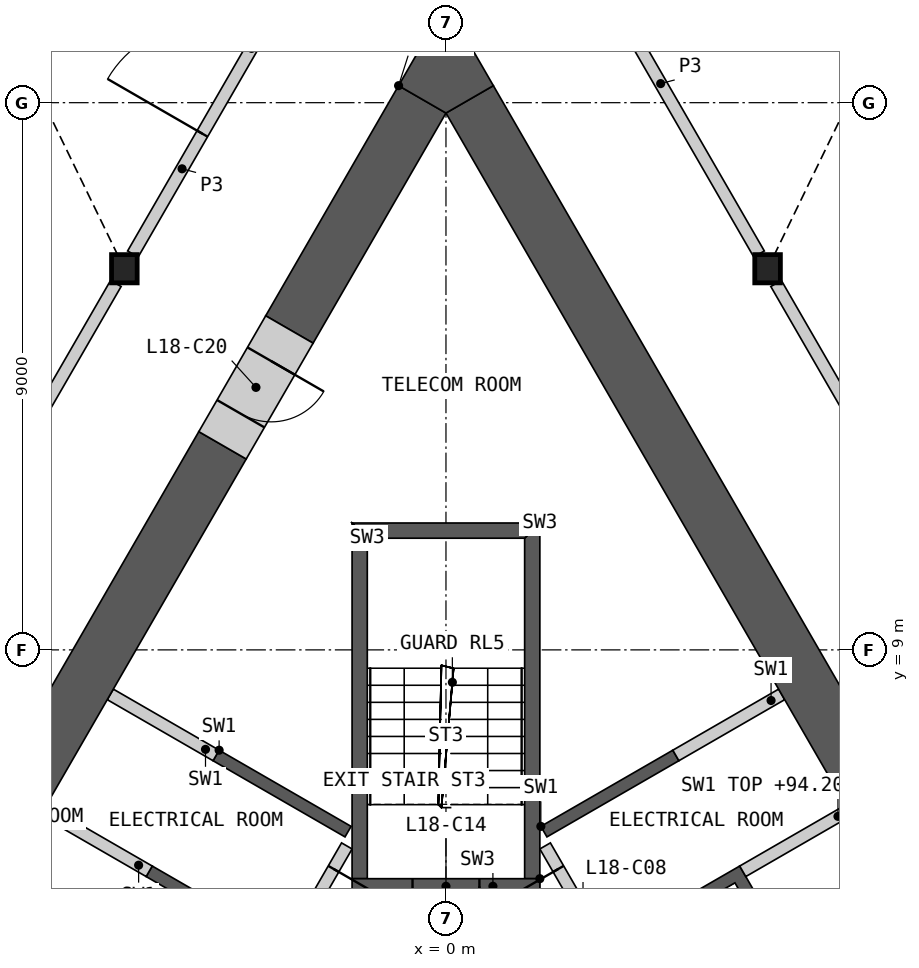
"""IFC4 building model, lengths in metres.
Left out: names, types, materials, properties, quantities, classifications, styles, units other than length and angle.
Written with IfcOpenShell. Run it as: python <this file> out.ifc"""

import sys

from ifc_helpers import new_model, si_unit, direction, frame, frame_2d, origin, origin_2d, place, context, subcontext, project, spatial, polyline, rectangle, i_section, outline, extrude, element, fill, save


model = new_model("IFC4")
c1 = context("Model", 3, precision=1e-05, world=origin(), true_north=direction((0.0, 1.0)))
c2 = subcontext(c1, "Body", "Model", "MODEL_VIEW")
j1 = project(units=[si_unit("LENGTHUNIT", "METRE"), si_unit("PLANEANGLEUNIT", "RADIAN")], contexts=[c1])
p1 = place(None, origin())
s1 = spatial("IfcSite", under=j1, at=p1, CompositionType="ELEMENT")
p2 = place(p1, origin())
s2 = spatial("IfcBuilding", under=s1, at=p2, CompositionType="ELEMENT")
p3 = place(p2, frame((0.0, 0.0, 84.6)))
s3 = spatial("IfcBuildingStorey", under=s2, at=p3, CompositionType="ELEMENT", Elevation=84.6)
for number, where, z_axis, x_axis in (
    (1, (-5.289, 15.269, 0.0), (0.0, 0.0, 1.0), (1.0, 0.0, 0.0)),
    (2, (5.289, 15.269, 0.0), (0.0, 0.0, 1.0), (1.0, 0.0, 0.0)),
):
    element("IfcColumn", number, at=place(p3, frame(where, z_axis=z_axis, x_axis=x_axis)), inside=s3, PredefinedType="COLUMN", context=c2, shape_type="SweptSolid", body=[
        extrude(i_section(OverallWidth=0.421, OverallDepth=0.465, WebThickness=0.045, FlangeThickness=0.072, at=origin_2d()), origin(), (0.0, 0.0, 1.0), 10.0),
    ])
p4 = place(p3, origin())
e3 = element("IfcWall", 3, at=p4, inside=s3, PredefinedType="SHEAR", context=c2, shape_type="SweptSolid", body=[
    extrude(outline(polyline([(1.561, 6.097), (3.731, 7.35), (3.831, 7.177), (1.66, 5.924), (1.561, 6.097)])), origin(), (0.0, 0.0, 1.0), 9.6),
])
p5 = place(p3, origin())
e4 = element("IfcWall", 4, at=p5, inside=s3, PredefinedType="SHEAR", context=c2, shape_type="SweptSolid", body=[
    extrude(outline(polyline([(2.66, 4.192), (4.831, 5.445), (8.231, -0.444), (6.061, -1.697), (5.96, -1.524), (7.952, -0.374), (6.952, 1.358), (4.96, 0.208), (4.861, 0.381), (6.852, 1.531), (5.852, 3.263), (3.861, 2.113), (3.76, 2.287), (5.752, 3.437), (4.752, 5.169), (2.76, 4.019), (2.66, 4.192)])), origin(), (0.0, 0.0, 1.0), 9.6),
])
p6 = place(p3, frame((5.817, -1.476, 0.0), z_axis=(0.0, 0.0, 1.0), x_axis=(-0.500002616675, 0.866023893041, 0.0)))
e5 = element("IfcWall", 5, at=p6, inside=s3, PredefinedType="SOLIDWALL", context=c2, shape_type="SweptSolid", body=[
    extrude(rectangle(XDim=8.373, YDim=0.2, at=frame_2d((4.187, 0.0))), origin(), (0.0, 0.0, 1.0), 9.6),
])
p7 = place(p6, frame((0.337, 0.0, 0.0)))
e6 = element("IfcOpeningElement", 6, at=p7, cuts=e5, PredefinedType="OPENING", context=c2, shape_type="SweptSolid", body=[
    extrude(rectangle(XDim=1.1, YDim=2.1, at=frame_2d((0.55, 1.05))), frame((0.0, 0.11, 0.0), z_axis=(0.0, -1.0, 0.0), x_axis=(1.0, 0.0, 0.0)), (0.0, 0.0, 1.0), 0.22),
])
p8 = place(p6, frame((2.537, 0.0, 0.0)))
e7 = element("IfcOpeningElement", 7, at=p8, cuts=e5, PredefinedType="OPENING", context=c2, shape_type="SweptSolid", body=[
    extrude(rectangle(XDim=1.1, YDim=2.1, at=frame_2d((0.55, 1.05))), frame((0.0, 0.11, 0.0), z_axis=(0.0, -1.0, 0.0), x_axis=(1.0, 0.0, 0.0)), (0.0, 0.0, 1.0), 0.22),
])
p9 = place(p6, frame((4.737, 0.0, 0.0)))
e8 = element("IfcOpeningElement", 8, at=p9, cuts=e5, PredefinedType="OPENING", context=c2, shape_type="SweptSolid", body=[
    extrude(rectangle(XDim=1.1, YDim=2.1, at=frame_2d((0.55, 1.05))), frame((0.0, 0.11, 0.0), z_axis=(0.0, -1.0, 0.0), x_axis=(1.0, 0.0, 0.0)), (0.0, 0.0, 1.0), 0.22),
])
p10 = place(p6, frame((7.037, 0.0, 0.0)))
e9 = element("IfcOpeningElement", 9, at=p10, cuts=e5, PredefinedType="OPENING", context=c2, shape_type="SweptSolid", body=[
    extrude(rectangle(XDim=0.9, YDim=2.1, at=frame_2d((0.45, 1.05))), frame((0.0, 0.11, 0.0), z_axis=(0.0, -1.0, 0.0), x_axis=(1.0, 0.0, 0.0)), (0.0, 0.0, 1.0), 0.22),
])
p11 = place(p3, frame((4.881, 5.358, 0.0), z_axis=(0.0, 0.0, 1.0), x_axis=(0.866035824272, 0.499981950752, 0.0)))
e10 = element("IfcWall", 10, at=p11, inside=s3, PredefinedType="SHEAR", context=c2, shape_type="SweptSolid", body=[
    extrude(rectangle(XDim=2.009, YDim=0.2, at=frame_2d((1.004, 0.0))), origin(), (0.0, 0.0, 1.0), 9.6),
])
p12 = place(p3, frame((3.781, 7.263, 0.0), z_axis=(0.0, 0.0, 1.0), x_axis=(0.865983199114, 0.50007309351, 0.0)))
e11 = element("IfcWall", 11, at=p12, inside=s3, PredefinedType="SHEAR", context=c2, shape_type="SweptSolid", body=[
    extrude(rectangle(XDim=2.009, YDim=0.2, at=frame_2d((1.004, 0.0))), origin(), (0.0, 0.0, 1.0), 9.6),
])
p13 = place(p3, origin())
e12 = element("IfcWall", 12, at=p13, inside=s3, PredefinedType="SHEAR", context=c2, shape_type="SweptSolid", body=[
    extrude(outline(polyline([(-2.76, 4.019), (-4.931, 5.272), (-4.831, 5.445), (-2.66, 4.192), (-2.76, 4.019)])), origin(), (0.0, 0.0, 1.0), 9.6),
])
p14 = place(p3, origin())
e13 = element("IfcWall", 13, at=p14, inside=s3, PredefinedType="SHEAR", context=c2, shape_type="SweptSolid", body=[
    extrude(outline(polyline([(-3.731, 7.35), (-1.561, 6.097), (-1.66, 5.924), (-3.831, 7.177), (-3.731, 7.35)])), origin(), (0.0, 0.0, 1.0), 9.6),
])
p15 = place(p3, frame((-1.631, 5.776, 0.0), z_axis=(0.0, 0.0, 1.0), x_axis=(-0.499992876559, -0.866029516466, 0.0)))
e14 = element("IfcWall", 14, at=p15, inside=s3, PredefinedType="SOLIDWALL", context=c2, shape_type="SweptSolid", body=[
    extrude(rectangle(XDim=6.486, YDim=0.2, at=frame_2d((3.243, 0.0))), origin(), (0.0, 0.0, 1.0), 9.6),
])
p16 = place(p15, frame((0.437, 0.0, 0.0)))
e15 = element("IfcOpeningElement", 15, at=p16, cuts=e14, PredefinedType="OPENING", context=c2, shape_type="SweptSolid", body=[
    extrude(rectangle(XDim=0.9, YDim=2.1, at=frame_2d((0.45, 1.05))), frame((0.0, 0.11, 0.0), z_axis=(0.0, -1.0, 0.0), x_axis=(1.0, 0.0, 0.0)), (0.0, 0.0, 1.0), 0.22),
])
p17 = place(p15, frame((2.637, 0.0, 0.0)))
e16 = element("IfcOpeningElement", 16, at=p17, cuts=e14, PredefinedType="OPENING", context=c2, shape_type="SweptSolid", body=[
    extrude(rectangle(XDim=0.9, YDim=2.1, at=frame_2d((0.45, 1.05))), frame((0.0, 0.11, 0.0), z_axis=(0.0, -1.0, 0.0), x_axis=(1.0, 0.0, 0.0)), (0.0, 0.0, 1.0), 0.22),
])
p18 = place(p3, frame((-3.781, 7.263, 0.0), z_axis=(0.0, 0.0, 1.0), x_axis=(-0.865983199114, 0.50007309351, 0.0)))
e17 = element("IfcWall", 17, at=p18, inside=s3, PredefinedType="SHEAR", context=c2, shape_type="SweptSolid", body=[
    extrude(rectangle(XDim=2.009, YDim=0.2, at=frame_2d((1.004, 0.0))), origin(), (0.0, 0.0, 1.0), 9.6),
])
p19 = place(p3, frame((-4.881, 5.358, 0.0), z_axis=(0.0, 0.0, 1.0), x_axis=(-0.866035824272, 0.499981950752, 0.0)))
e18 = element("IfcWall", 18, at=p19, inside=s3, PredefinedType="SHEAR", context=c2, shape_type="SweptSolid", body=[
    extrude(rectangle(XDim=2.009, YDim=0.2, at=frame_2d((1.004, 0.0))), origin(), (0.0, 0.0, 1.0), 9.6),
])
p20 = place(p3, origin())
e19 = element("IfcWall", 19, at=p20, inside=s3, PredefinedType="SHEAR", context=c2, shape_type="SweptSolid", body=[
    extrude(outline(polyline([(1.544, 5.237), (1.544, 11.087), (1.294, 10.837), (1.294, 5.237), (1.544, 5.237)])), origin(), (0.0, 0.0, 1.0), 9.6),
])
p21 = place(p3, origin())
e20 = element("IfcWall", 20, at=p21, inside=s3, PredefinedType="SHEAR", context=c2, shape_type="SweptSolid", body=[
    extrude(outline(polyline([(1.544, 11.087), (-1.544, 11.087), (-1.294, 10.837), (1.294, 10.837), (1.544, 11.087)])), origin(), (0.0, 0.0, 1.0), 9.6),
])
p22 = place(p3, origin())
e21 = element("IfcWall", 21, at=p22, inside=s3, PredefinedType="SHEAR", context=c2, shape_type="SweptSolid", body=[
    extrude(outline(polyline([(-1.294, 10.837), (-1.544, 11.087), (-1.544, 5.237), (-1.294, 5.237), (-1.294, 10.837)])), origin(), (0.0, 0.0, 1.0), 9.6),
])
p23 = place(p3, frame((1.544, 5.112, 0.0), z_axis=(0.0, 0.0, 1.0), x_axis=(-1.0, 0.0, 0.0)))
e22 = element("IfcWall", 22, at=p23, inside=s3, PredefinedType="SHEAR", context=c2, shape_type="SweptSolid", body=[
    extrude(rectangle(XDim=3.088, YDim=0.25, at=frame_2d((1.544, 0.0))), origin(), (0.0, 0.0, 1.0), 9.6),
])
p24 = place(p23, frame((0.994, 0.0, 0.0)))
e23 = element("IfcOpeningElement", 23, at=p24, cuts=e22, PredefinedType="OPENING", context=c2, shape_type="SweptSolid", body=[
    extrude(rectangle(XDim=1.1, YDim=2.1, at=frame_2d((0.55, 1.05))), frame((0.0, 0.135, 0.0), z_axis=(0.0, -1.0, 0.0), x_axis=(1.0, 0.0, 0.0)), (0.0, 0.0, 1.0), 0.27),
])
p25 = place(p3, frame((8.16, 4.596, 0.0), z_axis=(0.0, 0.0, 1.0), x_axis=(-0.500009830349, 0.866019728156, 0.0)))
e24 = element("IfcWall", 24, at=p25, inside=s3, PredefinedType="SHEAR", context=c2, shape_type="SweptSolid", body=[
    extrude(rectangle(XDim=15.541, YDim=0.9, at=frame_2d((7.771, 0.0))), origin(), (0.0, 0.0, 1.0), 9.6),
])
p26 = place(p3, frame((-3.675, 12.365, 0.0), z_axis=(0.0, 0.0, 1.0), x_axis=(-0.500014716158, -0.86601690724, 0.0)))
e25 = element("IfcWall", 25, at=p26, inside=s3, PredefinedType="SHEAR", context=c2, shape_type="SweptSolid", body=[
    extrude(rectangle(XDim=8.99, YDim=0.9, at=frame_2d((4.495, 0.0))), origin(), (0.0, 0.0, 1.0), 9.6),
])
p27 = place(p3, frame((-0.39, 18.055, 0.0), z_axis=(0.0, 0.0, 1.0), x_axis=(-0.500014193307, -0.86601720912, 0.0)))
e26 = element("IfcWall", 26, at=p27, inside=s3, PredefinedType="SHEAR", context=c2, shape_type="SweptSolid", body=[
    extrude(rectangle(XDim=4.37, YDim=0.9, at=frame_2d((2.185, 0.0))), origin(), (0.0, 0.0, 1.0), 9.6),
])
p28 = place(p3, origin())
e27 = element("IfcWall", 27, at=p28, inside=s3, PredefinedType="SHEAR", context=c2, shape_type="SweptSolid", body=[
    extrude(outline(polyline([(-0.779, 18.28), (0.0, 19.63), (0.779, 18.28), (0.0, 17.83), (-0.779, 18.28)])), origin(), (0.0, 0.0, 1.0), 9.6),
])
p29 = place(p3, frame((-2.575, 14.27, 0.0), z_axis=(0.0, 0.0, 1.0), x_axis=(-0.499981787252, -0.866035918664, 0.0)))
e28 = element("IfcWall", 28, at=p29, inside=s3, PredefinedType="SHEAR", context=c2, shape_type="SweptSolid", body=[
    extrude(rectangle(XDim=2.2, YDim=0.9, at=frame_2d((1.1, 0.0))), origin(), (0.0, 0.0, 1.0), 9.6),
])
p30 = place(p29, frame((0.6, 0.0, 0.0)))
e29 = element("IfcOpeningElement", 29, at=p30, cuts=e28, PredefinedType="OPENING", context=c2, shape_type="SweptSolid", body=[
    extrude(rectangle(XDim=1.0, YDim=2.1, at=frame_2d((0.5, 1.05))), frame((0.0, 0.46, 0.0), z_axis=(0.0, -1.0, 0.0), x_axis=(1.0, 0.0, 0.0)), (0.0, 0.0, 1.0), 0.92),
])
p31 = place(p3, frame((5.429, 15.026, 0.0), z_axis=(0.0, 0.0, 1.0), x_axis=(0.50001002959, -0.86601961312, 0.0)))
e30 = element("IfcWall", 30, at=p31, inside=s3, PredefinedType="PARTITIONING", context=c2, shape_type="SweptSolid", body=[
    extrude(rectangle(XDim=10.019, YDim=0.2, at=frame_2d((5.009, 0.0))), origin(), (0.0, 0.0, 1.0), 9.6),
])
p32 = place(p31, frame((4.059, 0.0, 0.0)))
e31 = element("IfcOpeningElement", 31, at=p32, cuts=e30, PredefinedType="OPENING", context=c2, shape_type="SweptSolid", body=[
    extrude(rectangle(XDim=1.8, YDim=2.1, at=frame_2d((0.9, 1.05))), frame((0.0, 0.11, 0.0), z_axis=(0.0, -1.0, 0.0), x_axis=(1.0, 0.0, 0.0)), (0.0, 0.0, 1.0), 0.22),
])
p33 = place(p3, frame((-10.439, 6.35, 0.0), z_axis=(0.0, 0.0, 1.0), x_axis=(0.50001002959, 0.86601961312, 0.0)))
e32 = element("IfcWall", 32, at=p33, inside=s3, PredefinedType="PARTITIONING", context=c2, shape_type="SweptSolid", body=[
    extrude(rectangle(XDim=10.019, YDim=0.2, at=frame_2d((5.009, 0.0))), origin(), (0.0, 0.0, 1.0), 9.6),
])
p34 = place(p3, frame((1.913, 21.116, 0.0), z_axis=(0.0, 0.0, 1.0), x_axis=(0.500001069878, -0.866024786089, 0.0)))
e33 = element("IfcWall", 33, at=p34, inside=s3, PredefinedType="PARTITIONING", context=c2, shape_type="SweptSolid", body=[
    extrude(rectangle(XDim=6.473, YDim=0.2, at=frame_2d((3.236, 0.0))), origin(), (0.0, 0.0, 1.0), 9.6),
])
p35 = place(p3, frame((-5.149, 15.511, 0.0), z_axis=(0.0, 0.0, 1.0), x_axis=(0.500001069878, 0.866024786089, 0.0)))
e34 = element("IfcWall", 34, at=p35, inside=s3, PredefinedType="PARTITIONING", context=c2, shape_type="SweptSolid", body=[
    extrude(rectangle(XDim=6.473, YDim=0.2, at=frame_2d((3.236, 0.0))), origin(), (0.0, 0.0, 1.0), 9.6),
])
p36 = place(p35, frame((2.285, 0.0, 0.0)))
e35 = element("IfcOpeningElement", 35, at=p36, cuts=e34, PredefinedType="OPENING", context=c2, shape_type="SweptSolid", body=[
    extrude(rectangle(XDim=1.8, YDim=2.1, at=frame_2d((0.9, 1.05))), frame((0.0, 0.11, 0.0), z_axis=(0.0, -1.0, 0.0), x_axis=(1.0, 0.0, 0.0)), (0.0, 0.0, 1.0), 0.22),
])
p37 = place(p10, origin())
e36 = element("IfcDoor", 36, at=p37, inside=s3, OperationType="SINGLE_SWING_RIGHT", PredefinedType="DOOR", context=c2, shape_type="SweptSolid", body=[
    extrude(rectangle(XDim=0.9, YDim=2.1, at=frame_2d((0.45, 1.05))), frame((0.0, 0.025, 0.0), z_axis=(0.0, -1.0, 0.0), x_axis=(1.0, 0.0, 0.0)), (0.0, 0.0, 1.0), 0.05),
])
fill(e9, e36)
p38 = place(p16, origin())
e37 = element("IfcDoor", 37, at=p38, inside=s3, OperationType="SINGLE_SWING_LEFT", PredefinedType="DOOR", context=c2, shape_type="SweptSolid", body=[
    extrude(rectangle(XDim=0.9, YDim=2.1, at=frame_2d((0.45, 1.05))), frame((0.0, 0.025, 0.0), z_axis=(0.0, -1.0, 0.0), x_axis=(1.0, 0.0, 0.0)), (0.0, 0.0, 1.0), 0.05),
])
fill(e15, e37)
p39 = place(p24, origin())
e38 = element("IfcDoor", 38, at=p39, inside=s3, OperationType="SINGLE_SWING_LEFT", PredefinedType="DOOR", context=c2, shape_type="SweptSolid", body=[
    extrude(rectangle(XDim=1.1, YDim=2.1, at=frame_2d((0.55, 1.05))), frame((0.0, 0.025, 0.0), z_axis=(0.0, -1.0, 0.0), x_axis=(1.0, 0.0, 0.0)), (0.0, 0.0, 1.0), 0.05),
])
fill(e23, e38)
p40 = place(p30, origin())
e39 = element("IfcDoor", 39, at=p40, inside=s3, OperationType="SINGLE_SWING_LEFT", PredefinedType="DOOR", context=c2, shape_type="SweptSolid", body=[
    extrude(rectangle(XDim=1.0, YDim=2.1, at=frame_2d((0.5, 1.05))), frame((0.0, 0.205, 0.0), z_axis=(0.0, -1.0, 0.0), x_axis=(1.0, 0.0, 0.0)), (0.0, 0.0, 1.0), 0.05),
])
fill(e29, e39)
p41 = place(p36, origin())
e40 = element("IfcDoor", 40, at=p41, inside=s3, OperationType="DOUBLE_DOOR_SINGLE_SWING", PredefinedType="DOOR", context=c2, shape_type="SweptSolid", body=[
    extrude(rectangle(XDim=1.8, YDim=2.1, at=frame_2d((0.9, 1.05))), frame((0.0, 0.025, 0.0), z_axis=(0.0, -1.0, 0.0), x_axis=(1.0, 0.0, 0.0)), (0.0, 0.0, 1.0), 0.05),
])
fill(e35, e40)
save(model, sys.argv[1])
